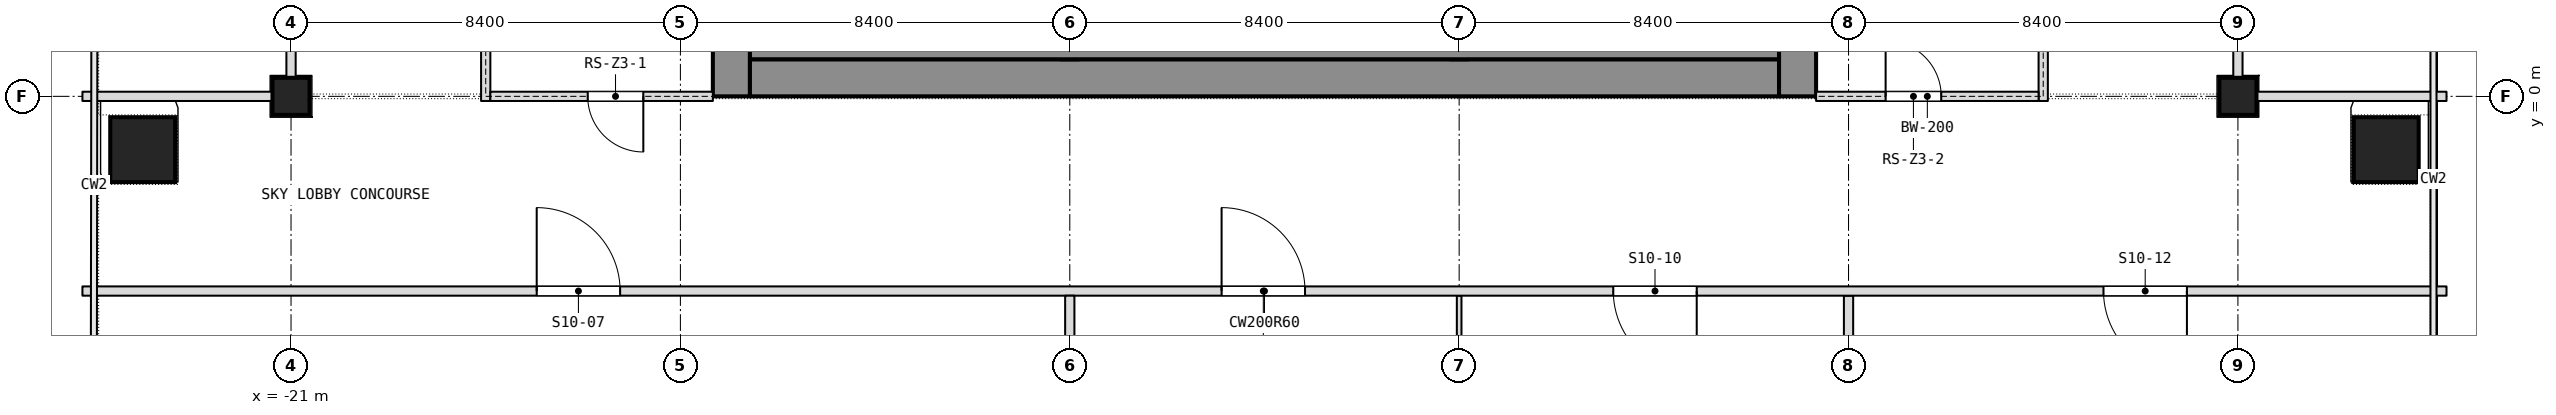
"""IFC4 building model, lengths in metres.
Left out: names, types, materials, properties, quantities, classifications, styles, units other than length and angle.
Written with IfcOpenShell. Run it as: python <this file> out.ifc"""

import sys

from ifc_helpers import new_model, si_unit, direction, frame, frame_2d, origin, origin_2d, place, context, subcontext, project, spatial, rectangle, extrude, element, fill, save


model = new_model("IFC4")
c1 = context("Model", 3, precision=1e-05, world=origin(), true_north=direction((0.0, 1.0)))
c2 = subcontext(c1, "Body", "Model", "MODEL_VIEW")
j1 = project(units=[si_unit("LENGTHUNIT", "METRE"), si_unit("PLANEANGLEUNIT", "RADIAN")], contexts=[c1])
p1 = place(None, origin())
s1 = spatial("IfcSite", under=j1, at=p1, CompositionType="ELEMENT")
p2 = place(p1, origin())
s2 = spatial("IfcBuilding", under=s1, at=p2, CompositionType="ELEMENT")
p3 = place(p2, frame((0.0, 0.0, 180.5)))
s3 = spatial("IfcBuildingStorey", under=s2, at=p3, CompositionType="ELEMENT", Elevation=180.5)
p4 = place(p3, frame((11.5, 0.0, 0.0), z_axis=(0.0, 0.0, 1.0), x_axis=(0.0, 1.0, 0.0)))
e1 = element("IfcWall", 1, at=p4, inside=s3, PredefinedType="SHEAR", context=c2, shape_type="SweptSolid", body=[
    extrude(rectangle(XDim=16.8, YDim=0.8, at=frame_2d((8.4, 0.0))), origin(), (0.0, 0.0, 1.0), 7.2),
])
p5 = place(p4, frame((2.3, 0.0, 0.0)))
e2 = element("IfcOpeningElement", 2, at=p5, cuts=e1, PredefinedType="OPENING", context=c2, shape_type="SweptSolid", body=[
    extrude(rectangle(XDim=1.1, YDim=2.1, at=frame_2d((0.55, 1.05))), frame((0.0, 0.4, 0.0), z_axis=(0.0, -1.0, 0.0), x_axis=(1.0, 0.0, 0.0)), (0.0, 0.0, 1.0), 0.8),
])
p6 = place(p4, frame((4.85, 0.0, 0.0)))
e3 = element("IfcOpeningElement", 3, at=p6, cuts=e1, PredefinedType="OPENING", context=c2, shape_type="SweptSolid", body=[
    extrude(rectangle(XDim=1.1, YDim=2.1, at=frame_2d((0.55, 1.05))), frame((0.0, 0.4, 0.0), z_axis=(0.0, -1.0, 0.0), x_axis=(1.0, 0.0, 0.0)), (0.0, 0.0, 1.0), 0.8),
])
p7 = place(p4, frame((6.825, 0.0, 0.0)))
e4 = element("IfcOpeningElement", 4, at=p7, cuts=e1, PredefinedType="OPENING", context=c2, shape_type="SweptSolid", body=[
    extrude(rectangle(XDim=1.2, YDim=2.1, at=frame_2d((0.6, 1.05))), frame((0.0, 0.4, 0.0), z_axis=(0.0, -1.0, 0.0), x_axis=(1.0, 0.0, 0.0)), (0.0, 0.0, 1.0), 0.8),
])
p8 = place(p4, frame((13.4, 0.0, 0.0)))
e5 = element("IfcOpeningElement", 5, at=p8, cuts=e1, PredefinedType="OPENING", context=c2, shape_type="SweptSolid", body=[
    extrude(rectangle(XDim=1.1, YDim=2.1, at=frame_2d((0.55, 1.05))), frame((0.0, 0.4, 0.0), z_axis=(0.0, -1.0, 0.0), x_axis=(1.0, 0.0, 0.0)), (0.0, 0.0, 1.0), 0.8),
])
p9 = place(p4, frame((10.85, 0.0, 0.0)))
e6 = element("IfcOpeningElement", 6, at=p9, cuts=e1, PredefinedType="OPENING", context=c2, shape_type="SweptSolid", body=[
    extrude(rectangle(XDim=1.1, YDim=2.1, at=frame_2d((0.55, 1.05))), frame((0.0, 0.4, 0.0), z_axis=(0.0, -1.0, 0.0), x_axis=(1.0, 0.0, 0.0)), (0.0, 0.0, 1.0), 0.8),
])
p10 = place(p4, frame((8.775, 0.0, 0.0)))
e7 = element("IfcOpeningElement", 7, at=p10, cuts=e1, PredefinedType="OPENING", context=c2, shape_type="SweptSolid", body=[
    extrude(rectangle(XDim=1.2, YDim=2.1, at=frame_2d((0.6, 1.05))), frame((0.0, 0.4, 0.0), z_axis=(0.0, -1.0, 0.0), x_axis=(1.0, 0.0, 0.0)), (0.0, 0.0, 1.0), 0.8),
])
p11 = place(p3, frame((-11.5, 0.0, 0.0), z_axis=(0.0, 0.0, 1.0), x_axis=(0.0, 1.0, 0.0)))
e8 = element("IfcWall", 8, at=p11, inside=s3, PredefinedType="SHEAR", context=c2, shape_type="SweptSolid", body=[
    extrude(rectangle(XDim=16.8, YDim=0.8, at=frame_2d((8.4, 0.0))), origin(), (0.0, 0.0, 1.0), 7.2),
])
p12 = place(p11, frame((3.6, 0.0, 0.0)))
e9 = element("IfcOpeningElement", 9, at=p12, cuts=e8, PredefinedType="OPENING", context=c2, shape_type="SweptSolid", body=[
    extrude(rectangle(XDim=0.9, YDim=2.1, at=frame_2d((0.45, 1.05))), frame((0.0, 0.4, 0.0), z_axis=(0.0, -1.0, 0.0), x_axis=(1.0, 0.0, 0.0)), (0.0, 0.0, 1.0), 0.8),
])
p13 = place(p11, frame((6.825, 0.0, 0.0)))
e10 = element("IfcOpeningElement", 10, at=p13, cuts=e8, PredefinedType="OPENING", context=c2, shape_type="SweptSolid", body=[
    extrude(rectangle(XDim=1.2, YDim=2.1, at=frame_2d((0.6, 1.05))), frame((0.0, 0.4, 0.0), z_axis=(0.0, -1.0, 0.0), x_axis=(1.0, 0.0, 0.0)), (0.0, 0.0, 1.0), 0.8),
])
p14 = place(p11, frame((12.3, 0.0, 0.0)))
e11 = element("IfcOpeningElement", 11, at=p14, cuts=e8, PredefinedType="OPENING", context=c2, shape_type="SweptSolid", body=[
    extrude(rectangle(XDim=0.9, YDim=2.1, at=frame_2d((0.45, 1.05))), frame((0.0, 0.4, 0.0), z_axis=(0.0, -1.0, 0.0), x_axis=(1.0, 0.0, 0.0)), (0.0, 0.0, 1.0), 0.8),
])
p15 = place(p11, frame((8.775, 0.0, 0.0)))
e12 = element("IfcOpeningElement", 12, at=p15, cuts=e8, PredefinedType="OPENING", context=c2, shape_type="SweptSolid", body=[
    extrude(rectangle(XDim=1.2, YDim=2.1, at=frame_2d((0.6, 1.05))), frame((0.0, 0.4, 0.0), z_axis=(0.0, -1.0, 0.0), x_axis=(1.0, 0.0, 0.0)), (0.0, 0.0, 1.0), 0.8),
])
p16 = place(p3, frame((-11.1, 0.4, 0.0), z_axis=(0.0, 0.0, 1.0), x_axis=(1.0, 0.0, 0.0)))
e13 = element("IfcWall", 13, at=p16, inside=s3, PredefinedType="SHEAR", context=c2, shape_type="SweptSolid", body=[
    extrude(rectangle(XDim=22.2, YDim=0.8, at=frame_2d((11.1, 0.0))), origin(), (0.0, 0.0, 1.0), 7.2),
])
p17 = place(p3, frame((-4.2, 0.8, 0.0), z_axis=(0.0, 0.0, 1.0), x_axis=(0.0, 1.0, 0.0)))
e14 = element("IfcWall", 14, at=p17, inside=s3, PredefinedType="SHEAR", context=c2, shape_type="SweptSolid", body=[
    extrude(rectangle(XDim=15.2, YDim=0.4, at=frame_2d((7.6, 0.0))), origin(), (0.0, 0.0, 1.0), 7.2),
])
p18 = place(p17, frame((8.5, 0.0, 0.0)))
e15 = element("IfcOpeningElement", 15, at=p18, cuts=e14, PredefinedType="OPENING", context=c2, shape_type="SweptSolid", body=[
    extrude(rectangle(XDim=1.2, YDim=2.1, at=frame_2d((0.6, 1.05))), frame((0.0, 0.2, 0.0), z_axis=(0.0, -1.0, 0.0), x_axis=(1.0, 0.0, 0.0)), (0.0, 0.0, 1.0), 0.4),
])
p19 = place(p3, frame((4.2, 0.8, 0.0), z_axis=(0.0, 0.0, 1.0), x_axis=(0.0, 1.0, 0.0)))
e16 = element("IfcWall", 16, at=p19, inside=s3, PredefinedType="SHEAR", context=c2, shape_type="SweptSolid", body=[
    extrude(rectangle(XDim=15.2, YDim=0.4, at=frame_2d((7.6, 0.0))), origin(), (0.0, 0.0, 1.0), 7.2),
])
p20 = place(p19, frame((5.95, 0.0, 0.0)))
e17 = element("IfcOpeningElement", 17, at=p20, cuts=e16, PredefinedType="OPENING", context=c2, shape_type="SweptSolid", body=[
    extrude(rectangle(XDim=1.2, YDim=2.1, at=frame_2d((0.6, 1.05))), frame((0.0, 0.2, 0.0), z_axis=(0.0, -1.0, 0.0), x_axis=(1.0, 0.0, 0.0)), (0.0, 0.0, 1.0), 0.4),
])
for number, where, z_axis, x_axis in (
    (18, (24.2, -1.15, 0.0), (0.0, 0.0, 1.0), (1.0, 0.0, 0.0)),
    (19, (-24.2, -1.15, 0.0), (0.0, 0.0, 1.0), (1.0, 0.0, 0.0)),
):
    element("IfcColumn", number, at=place(p3, frame(where, z_axis=z_axis, x_axis=x_axis)), inside=s3, PredefinedType="COLUMN", context=c2, shape_type="SweptSolid", body=[
        extrude(rectangle(XDim=1.4, YDim=1.4, at=origin_2d()), origin(), (0.0, 0.0, 1.0), 7.2),
    ])
for number, where, z_axis, x_axis in (
    (20, (-21.0, 0.0, 0.0), (0.0, 0.0, 1.0), (1.0, 0.0, 0.0)),
    (21, (21.0, 0.0, 0.0), (0.0, 0.0, 1.0), (1.0, 0.0, 0.0)),
):
    element("IfcColumn", number, at=place(p3, frame(where, z_axis=z_axis, x_axis=x_axis)), inside=s3, PredefinedType="COLUMN", context=c2, shape_type="SweptSolid", body=[
        extrude(rectangle(XDim=0.8, YDim=0.8, at=origin_2d()), origin(), (0.0, 0.0, 1.0), 7.2),
    ])
p21 = place(p3, frame((21.0, -0.1, 0.0), z_axis=(0.0, 0.0, 1.0), x_axis=(0.0, 1.0, 0.0)))
e22 = element("IfcWall", 22, at=p21, inside=s3, PredefinedType="PARTITIONING", context=c2, shape_type="SweptSolid", body=[
    extrude(rectangle(XDim=16.9, YDim=0.2, at=frame_2d((8.45, 0.0))), origin(), (0.0, 0.0, 1.0), 6.94),
])
p22 = place(p21, frame((1.7, 0.0, 0.0)))
e23 = element("IfcOpeningElement", 23, at=p22, cuts=e22, PredefinedType="OPENING", context=c2, shape_type="SweptSolid", body=[
    extrude(rectangle(XDim=1.0, YDim=2.1, at=frame_2d((0.5, 1.05))), frame((0.0, 0.1, 0.0), z_axis=(0.0, -1.0, 0.0), x_axis=(1.0, 0.0, 0.0)), (0.0, 0.0, 1.0), 0.2),
])
p23 = place(p21, frame((5.9, 0.0, 0.0)))
e24 = element("IfcOpeningElement", 24, at=p23, cuts=e22, PredefinedType="OPENING", context=c2, shape_type="SweptSolid", body=[
    extrude(rectangle(XDim=1.0, YDim=2.1, at=frame_2d((0.5, 1.05))), frame((0.0, 0.1, 0.0), z_axis=(0.0, -1.0, 0.0), x_axis=(1.0, 0.0, 0.0)), (0.0, 0.0, 1.0), 0.2),
])
p24 = place(p21, frame((12.15, 0.0, 0.0)))
e25 = element("IfcOpeningElement", 25, at=p24, cuts=e22, PredefinedType="OPENING", context=c2, shape_type="SweptSolid", body=[
    extrude(rectangle(XDim=1.0, YDim=2.1, at=frame_2d((0.5, 1.05))), frame((0.0, 0.1, 0.0), z_axis=(0.0, -1.0, 0.0), x_axis=(1.0, 0.0, 0.0)), (0.0, 0.0, 1.0), 0.2),
])
p25 = place(p3, frame((12.6, -28.343, 0.0), z_axis=(0.0, 0.0, 1.0), x_axis=(0.0, 1.0, 0.0)))
e26 = element("IfcWall", 26, at=p25, inside=s3, PredefinedType="PARTITIONING", context=c2, shape_type="SweptSolid", body=[
    extrude(rectangle(XDim=24.043, YDim=0.2, at=frame_2d((12.021, 0.0))), origin(), (0.0, 0.0, 1.0), 6.94),
])
p26 = place(p3, frame((4.2, -7.98, 0.0), z_axis=(0.0, 0.0, 1.0), x_axis=(0.0, 1.0, 0.0)))
e27 = element("IfcWall", 27, at=p26, inside=s3, PredefinedType="PARTITIONING", context=c2, shape_type="SweptSolid", body=[
    extrude(rectangle(XDim=3.68, YDim=0.1, at=frame_2d((1.84, 0.0))), origin(), (0.0, 0.0, 1.0), 6.94),
])
p27 = place(p3, frame((-25.5, -4.2, 0.0), z_axis=(0.0, 0.0, 1.0), x_axis=(1.0, 0.0, 0.0)))
e28 = element("IfcWall", 28, at=p27, inside=s3, PredefinedType="PARTITIONING", context=c2, shape_type="SweptSolid", body=[
    extrude(rectangle(XDim=51.0, YDim=0.2, at=frame_2d((25.5, 0.0))), origin(), (0.0, 0.0, 1.0), 6.94),
])
p28 = place(p27, frame((9.8, 0.0, 0.0)))
e29 = element("IfcOpeningElement", 29, at=p28, cuts=e28, PredefinedType="OPENING", context=c2, shape_type="SweptSolid", body=[
    extrude(rectangle(XDim=1.8, YDim=2.1, at=frame_2d((0.9, 1.05))), frame((0.0, 0.1, 0.0), z_axis=(0.0, -1.0, 0.0), x_axis=(1.0, 0.0, 0.0)), (0.0, 0.0, 1.0), 0.2),
])
p29 = place(p27, frame((24.575, 0.0, 0.0)))
e30 = element("IfcOpeningElement", 30, at=p29, cuts=e28, PredefinedType="OPENING", context=c2, shape_type="SweptSolid", body=[
    extrude(rectangle(XDim=1.8, YDim=2.1, at=frame_2d((0.9, 1.05))), frame((0.0, 0.1, 0.0), z_axis=(0.0, -1.0, 0.0), x_axis=(1.0, 0.0, 0.0)), (0.0, 0.0, 1.0), 0.2),
])
p30 = place(p27, frame((33.025, 0.0, 0.0)))
e31 = element("IfcOpeningElement", 31, at=p30, cuts=e28, PredefinedType="OPENING", context=c2, shape_type="SweptSolid", body=[
    extrude(rectangle(XDim=1.8, YDim=2.1, at=frame_2d((0.9, 1.05))), frame((0.0, 0.1, 0.0), z_axis=(0.0, -1.0, 0.0), x_axis=(1.0, 0.0, 0.0)), (0.0, 0.0, 1.0), 0.2),
])
p31 = place(p27, frame((43.6, 0.0, 0.0)))
e32 = element("IfcOpeningElement", 32, at=p31, cuts=e28, PredefinedType="OPENING", context=c2, shape_type="SweptSolid", body=[
    extrude(rectangle(XDim=1.8, YDim=2.1, at=frame_2d((0.9, 1.05))), frame((0.0, 0.1, 0.0), z_axis=(0.0, -1.0, 0.0), x_axis=(1.0, 0.0, 0.0)), (0.0, 0.0, 1.0), 0.2),
])
for number, where, z_axis, x_axis in (
    (33, (-25.5, 0.0, 0.0), (0.0, 0.0, 1.0), (1.0, 0.0, 0.0)),
    (34, (21.1, 0.0, 0.0), (0.0, 0.0, 1.0), (1.0, 0.0, 0.0)),
):
    element("IfcWall", number, at=place(p3, frame(where, z_axis=z_axis, x_axis=x_axis)), inside=s3, PredefinedType="PARTITIONING", context=c2, shape_type="SweptSolid", body=[
        extrude(rectangle(XDim=4.4, YDim=0.2, at=frame_2d((2.2, 0.0))), origin(), (0.0, 0.0, 1.0), 6.54),
    ])
p32 = place(p3, frame((-4.2, -28.9, 0.0), z_axis=(0.0, 0.0, 1.0), x_axis=(0.0, 1.0, 0.0)))
e35 = element("IfcWall", 35, at=p32, inside=s3, PredefinedType="PARTITIONING", context=c2, shape_type="SweptSolid", body=[
    extrude(rectangle(XDim=24.6, YDim=0.2, at=frame_2d((12.3, 0.0))), origin(), (0.0, 0.0, 1.0), 6.94),
])
p33 = place(p3, frame((-21.0, -0.1, 0.0), z_axis=(0.0, 0.0, 1.0), x_axis=(0.0, 1.0, 0.0)))
e36 = element("IfcWall", 36, at=p33, inside=s3, PredefinedType="PARTITIONING", context=c2, shape_type="SweptSolid", body=[
    extrude(rectangle(XDim=22.493, YDim=0.2, at=frame_2d((11.247, 0.0))), origin(), (0.0, 0.0, 1.0), 6.94),
])
p34 = place(p33, frame((3.8, 0.0, 0.0)))
e37 = element("IfcOpeningElement", 37, at=p34, cuts=e36, PredefinedType="OPENING", context=c2, shape_type="SweptSolid", body=[
    extrude(rectangle(XDim=1.0, YDim=2.1, at=frame_2d((0.5, 1.05))), frame((0.0, 0.1, 0.0), z_axis=(0.0, -1.0, 0.0), x_axis=(1.0, 0.0, 0.0)), (0.0, 0.0, 1.0), 0.2),
])
p35 = place(p33, frame((14.946, 0.0, 0.0)))
e38 = element("IfcOpeningElement", 38, at=p35, cuts=e36, PredefinedType="OPENING", context=c2, shape_type="SweptSolid", body=[
    extrude(rectangle(XDim=1.0, YDim=2.1, at=frame_2d((0.5, 1.05))), frame((0.0, 0.1, 0.0), z_axis=(0.0, -1.0, 0.0), x_axis=(1.0, 0.0, 0.0)), (0.0, 0.0, 1.0), 0.2),
])
p36 = place(p3, frame((-11.1, 1.15, 0.0), z_axis=(0.0, 0.0, 1.0), x_axis=(1.0, 0.0, 0.0)))
e39 = element("IfcWall", 39, at=p36, inside=s3, PredefinedType="PARTITIONING", context=c2, shape_type="SweptSolid", body=[
    extrude(rectangle(XDim=22.2, YDim=0.7, at=frame_2d((11.1, 0.0))), origin(), (0.0, 0.0, 1.0), 6.94),
])
p37 = place(p3, frame((-16.8, -0.1, 0.0), z_axis=(0.0, 0.0, 1.0), x_axis=(0.0, 1.0, 0.0)))
e40 = element("IfcWall", 40, at=p37, inside=s3, PredefinedType="PARTITIONING", context=c2, shape_type="SweptSolid", body=[
    extrude(rectangle(XDim=17.0, YDim=0.2, at=frame_2d((8.5, 0.0))), origin(), (0.0, 0.0, 1.0), 6.94),
])
p38 = place(p37, frame((1.9, 0.0, 0.0)))
e41 = element("IfcOpeningElement", 41, at=p38, cuts=e40, PredefinedType="OPENING", context=c2, shape_type="SweptSolid", body=[
    extrude(rectangle(XDim=2.4, YDim=2.1, at=frame_2d((1.2, 1.05))), frame((0.0, 0.1, 0.0), z_axis=(0.0, -1.0, 0.0), x_axis=(1.0, 0.0, 0.0)), (0.0, 0.0, 1.0), 0.2),
])
p39 = place(p37, frame((12.7, 0.0, 0.0)))
e42 = element("IfcOpeningElement", 42, at=p39, cuts=e40, PredefinedType="OPENING", context=c2, shape_type="SweptSolid", body=[
    extrude(rectangle(XDim=2.4, YDim=2.1, at=frame_2d((1.2, 1.05))), frame((0.0, 0.1, 0.0), z_axis=(0.0, -1.0, 0.0), x_axis=(1.0, 0.0, 0.0)), (0.0, 0.0, 1.0), 0.2),
])
p40 = place(p3, frame((-16.7, 0.0, 0.0), z_axis=(0.0, 0.0, 1.0), x_axis=(1.0, 0.0, 0.0)))
e43 = element("IfcWall", 43, at=p40, inside=s3, PredefinedType="PARTITIONING", context=c2, shape_type="SweptSolid", body=[
    extrude(rectangle(XDim=4.8, YDim=0.2, at=frame_2d((2.4, 0.0))), origin(), (0.0, 0.0, 1.0), 6.54),
])
p41 = place(p40, frame((2.1, 0.0, 0.0)))
e44 = element("IfcOpeningElement", 44, at=p41, cuts=e43, PredefinedType="OPENING", context=c2, shape_type="SweptSolid", body=[
    extrude(rectangle(XDim=1.2, YDim=2.1, at=frame_2d((0.6, 1.05))), frame((0.0, 0.1, 0.0), z_axis=(0.0, -1.0, 0.0), x_axis=(1.0, 0.0, 0.0)), (0.0, 0.0, 1.0), 0.2),
])
p42 = place(p3, frame((16.8, -0.1, 0.0), z_axis=(0.0, 0.0, 1.0), x_axis=(0.0, 1.0, 0.0)))
e45 = element("IfcWall", 45, at=p42, inside=s3, PredefinedType="PARTITIONING", context=c2, shape_type="SweptSolid", body=[
    extrude(rectangle(XDim=17.0, YDim=0.2, at=frame_2d((8.5, 0.0))), origin(), (0.0, 0.0, 1.0), 6.94),
])
p43 = place(p42, frame((1.9, 0.0, 0.0)))
e46 = element("IfcOpeningElement", 46, at=p43, cuts=e45, PredefinedType="OPENING", context=c2, shape_type="SweptSolid", body=[
    extrude(rectangle(XDim=2.4, YDim=2.1, at=frame_2d((1.2, 1.05))), frame((0.0, 0.1, 0.0), z_axis=(0.0, -1.0, 0.0), x_axis=(1.0, 0.0, 0.0)), (0.0, 0.0, 1.0), 0.2),
])
p44 = place(p42, frame((12.7, 0.0, 0.0)))
e47 = element("IfcOpeningElement", 47, at=p44, cuts=e45, PredefinedType="OPENING", context=c2, shape_type="SweptSolid", body=[
    extrude(rectangle(XDim=2.4, YDim=2.1, at=frame_2d((1.2, 1.05))), frame((0.0, 0.1, 0.0), z_axis=(0.0, -1.0, 0.0), x_axis=(1.0, 0.0, 0.0)), (0.0, 0.0, 1.0), 0.2),
])
p45 = place(p3, frame((11.9, 0.0, 0.0), z_axis=(0.0, 0.0, 1.0), x_axis=(1.0, 0.0, 0.0)))
e48 = element("IfcWall", 48, at=p45, inside=s3, PredefinedType="PARTITIONING", context=c2, shape_type="SweptSolid", body=[
    extrude(rectangle(XDim=4.8, YDim=0.2, at=frame_2d((2.4, 0.0))), origin(), (0.0, 0.0, 1.0), 6.54),
])
p46 = place(p45, frame((1.5, 0.0, 0.0)))
e49 = element("IfcOpeningElement", 49, at=p46, cuts=e48, PredefinedType="OPENING", context=c2, shape_type="SweptSolid", body=[
    extrude(rectangle(XDim=1.2, YDim=2.1, at=frame_2d((0.6, 1.05))), frame((0.0, 0.1, 0.0), z_axis=(0.0, -1.0, 0.0), x_axis=(1.0, 0.0, 0.0)), (0.0, 0.0, 1.0), 0.2),
])
p47 = place(p28, origin())
e50 = element("IfcDoor", 50, at=p47, inside=s3, OperationType="DOUBLE_DOOR_SINGLE_SWING", PredefinedType="DOOR", context=c2, shape_type="SweptSolid", body=[
    extrude(rectangle(XDim=1.8, YDim=2.1, at=frame_2d((0.9, 1.05))), frame((0.0, 0.025, 0.0), z_axis=(0.0, -1.0, 0.0), x_axis=(1.0, 0.0, 0.0)), (0.0, 0.0, 1.0), 0.05),
])
fill(e29, e50)
p48 = place(p29, origin())
e51 = element("IfcDoor", 51, at=p48, inside=s3, OperationType="DOUBLE_DOOR_SINGLE_SWING", PredefinedType="DOOR", context=c2, shape_type="SweptSolid", body=[
    extrude(rectangle(XDim=1.8, YDim=2.1, at=frame_2d((0.9, 1.05))), frame((0.0, 0.025, 0.0), z_axis=(0.0, -1.0, 0.0), x_axis=(1.0, 0.0, 0.0)), (0.0, 0.0, 1.0), 0.05),
])
fill(e30, e51)
p49 = place(p30, origin())
e52 = element("IfcDoor", 52, at=p49, inside=s3, OperationType="DOUBLE_DOOR_SINGLE_SWING", PredefinedType="DOOR", context=c2, shape_type="SweptSolid", body=[
    extrude(rectangle(XDim=1.8, YDim=2.1, at=frame_2d((0.9, 1.05))), frame((0.0, 0.025, 0.0), z_axis=(0.0, -1.0, 0.0), x_axis=(1.0, 0.0, 0.0)), (0.0, 0.0, 1.0), 0.05),
])
fill(e31, e52)
p50 = place(p31, origin())
e53 = element("IfcDoor", 53, at=p50, inside=s3, OperationType="DOUBLE_DOOR_SINGLE_SWING", PredefinedType="DOOR", context=c2, shape_type="SweptSolid", body=[
    extrude(rectangle(XDim=1.8, YDim=2.1, at=frame_2d((0.9, 1.05))), frame((0.0, 0.025, 0.0), z_axis=(0.0, -1.0, 0.0), x_axis=(1.0, 0.0, 0.0)), (0.0, 0.0, 1.0), 0.05),
])
fill(e32, e53)
p51 = place(p41, origin())
e54 = element("IfcDoor", 54, at=p51, inside=s3, OperationType="SINGLE_SWING_LEFT", PredefinedType="DOOR", context=c2, shape_type="SweptSolid", body=[
    extrude(rectangle(XDim=1.2, YDim=2.1, at=frame_2d((0.6, 1.05))), frame((0.0, 0.025, 0.0), z_axis=(0.0, -1.0, 0.0), x_axis=(1.0, 0.0, 0.0)), (0.0, 0.0, 1.0), 0.05),
])
fill(e44, e54)
p52 = place(p46, origin())
e55 = element("IfcDoor", 55, at=p52, inside=s3, OperationType="SINGLE_SWING_LEFT", PredefinedType="DOOR", context=c2, shape_type="SweptSolid", body=[
    extrude(rectangle(XDim=1.2, YDim=2.1, at=frame_2d((0.6, 1.05))), frame((0.0, 0.025, 0.0), z_axis=(0.0, -1.0, 0.0), x_axis=(1.0, 0.0, 0.0)), (0.0, 0.0, 1.0), 0.05),
])
fill(e49, e55)
save(model, sys.argv[1])
